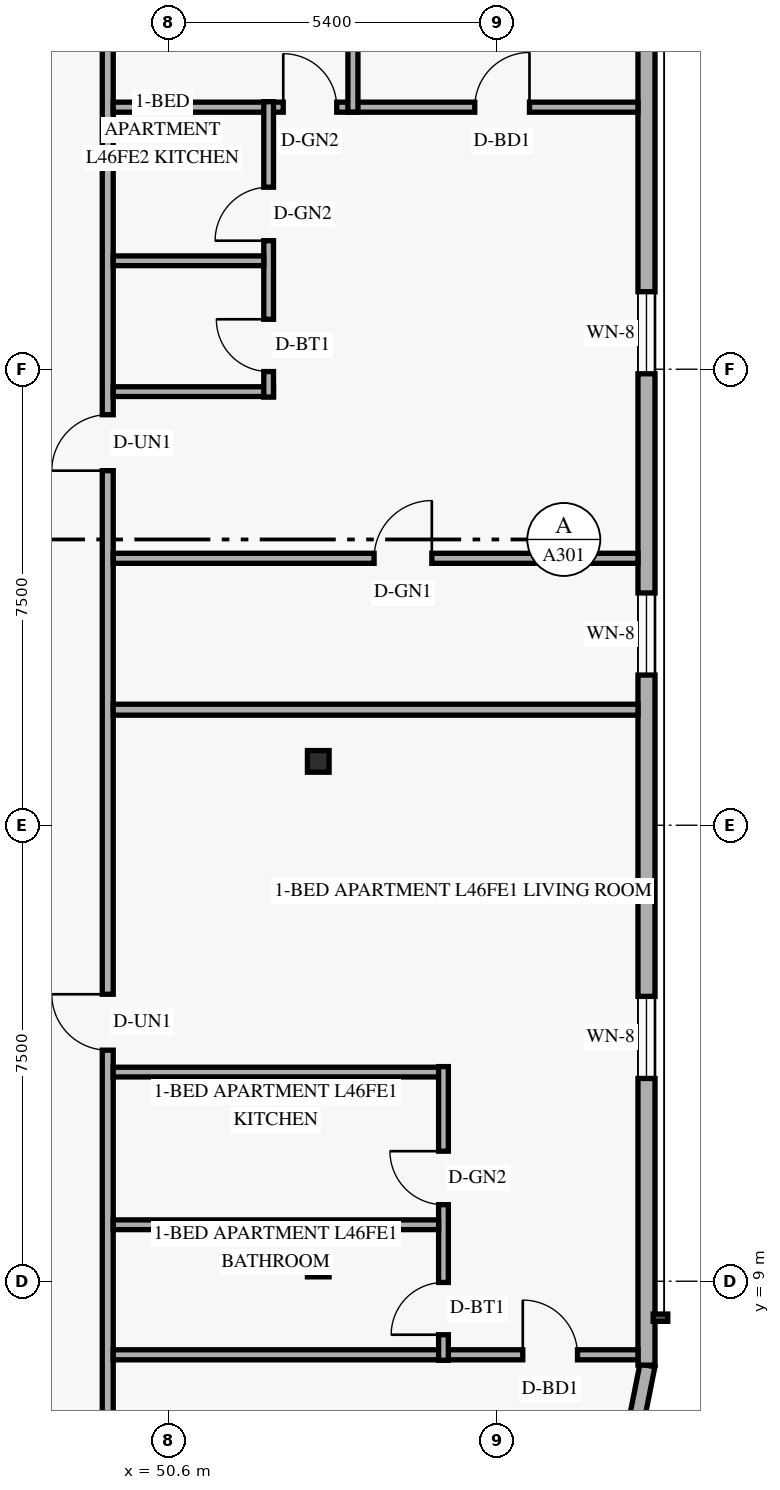
"""IFC4 building model, lengths in metres.
Left out: names, types, materials, properties, quantities, classifications, styles, units other than length and angle.
Written with IfcOpenShell. Run it as: python <this file> out.ifc"""

import sys

from ifc_helpers import new_model, si_unit, direction, frame, frame_2d, origin, origin_2d, place, context, subcontext, project, spatial, rectangle, hollow_rectangle, extrude, element, fill, save


model = new_model("IFC4")
c1 = context("Model", 3, precision=1e-05, world=origin(), true_north=direction((0.0, 1.0)))
c2 = subcontext(c1, "Body", "Model", "MODEL_VIEW")
j1 = project(units=[si_unit("LENGTHUNIT", "METRE"), si_unit("PLANEANGLEUNIT", "RADIAN")], contexts=[c1])
p1 = place(None, origin())
s1 = spatial("IfcSite", under=j1, at=p1, CompositionType="ELEMENT")
p2 = place(p1, origin())
s2 = spatial("IfcBuilding", under=s1, at=p2, CompositionType="ELEMENT")
p3 = place(p2, frame((0.0, 0.0, 177.6)))
s3 = spatial("IfcBuildingStorey", under=s2, at=p3, CompositionType="ELEMENT", Elevation=177.6)
for number, where, z_axis, x_axis in (
    (1, (52.958, 9.25, 0.0), (0.058, 0.0, 0.998), (0.0, 1.0, 0.0)),
    (2, (52.958, 17.55, 0.0), (0.058, 0.0, 0.998), (0.0, 1.0, 0.0)),
):
    element("IfcColumn", number, at=place(p3, frame(where, z_axis=z_axis, x_axis=x_axis)), inside=s3, PredefinedType="COLUMN", context=c2, shape_type="SweptSolid", body=[
        extrude(hollow_rectangle(XDim=0.356, YDim=0.356, WallThickness=0.016, at=origin_2d()), origin(), (0.0, 0.0, 1.0), 3.606),
    ])
p4 = place(p3, frame((58.205, 6.254, 0.0), z_axis=(0.0, 0.0, 1.0), x_axis=(0.19496651342, 0.980809899341, 0.0)))
e3 = element("IfcWall", 3, at=p4, inside=s3, PredefinedType="SOLIDWALL", context=c2, shape_type="SweptSolid", body=[
    extrude(rectangle(XDim=1.389, YDim=0.25, at=frame_2d((0.694, 0.0))), origin(), (0.0, 0.0, 1.0), 3.36),
])
p5 = place(p3, frame((58.46, 7.62, 0.0), z_axis=(0.0, 0.0, 1.0), x_axis=(0.0, 1.0, 0.0)))
e4 = element("IfcWall", 4, at=p5, inside=s3, PredefinedType="SOLIDWALL", context=c2, shape_type="SweptSolid", body=[
    extrude(rectangle(XDim=32.76, YDim=0.28, at=frame_2d((16.38, 0.0))), origin(), (0.0, 0.0, 1.0), 3.36),
])
p6 = place(p5, frame((4.715, 0.0, 0.85)))
e5 = element("IfcOpeningElement", 5, at=p6, cuts=e4, PredefinedType="OPENING", context=c2, shape_type="SweptSolid", body=[
    extrude(rectangle(XDim=1.35, YDim=1.55, at=frame_2d((0.675, 0.775))), frame((0.0, 0.15, 0.0), z_axis=(0.0, -1.0, 0.0), x_axis=(1.0, 0.0, 0.0)), (0.0, 0.0, 1.0), 0.3),
])
p7 = place(p5, frame((11.35, 0.0, 0.85)))
e6 = element("IfcOpeningElement", 6, at=p7, cuts=e4, PredefinedType="OPENING", context=c2, shape_type="SweptSolid", body=[
    extrude(rectangle(XDim=1.35, YDim=1.55, at=frame_2d((0.675, 0.775))), frame((0.0, 0.15, 0.0), z_axis=(0.0, -1.0, 0.0), x_axis=(1.0, 0.0, 0.0)), (0.0, 0.0, 1.0), 0.3),
])
p8 = place(p5, frame((16.305, 0.0, 0.85)))
e7 = element("IfcOpeningElement", 7, at=p8, cuts=e4, PredefinedType="OPENING", context=c2, shape_type="SweptSolid", body=[
    extrude(rectangle(XDim=1.35, YDim=1.55, at=frame_2d((0.675, 0.775))), frame((0.0, 0.15, 0.0), z_axis=(0.0, -1.0, 0.0), x_axis=(1.0, 0.0, 0.0)), (0.0, 0.0, 1.0), 0.3),
])
p9 = place(p5, frame((22.06, 0.0, 0.85)))
e8 = element("IfcOpeningElement", 8, at=p9, cuts=e4, PredefinedType="OPENING", context=c2, shape_type="SweptSolid", body=[
    extrude(rectangle(XDim=1.35, YDim=1.55, at=frame_2d((0.675, 0.775))), frame((0.0, 0.15, 0.0), z_axis=(0.0, -1.0, 0.0), x_axis=(1.0, 0.0, 0.0)), (0.0, 0.0, 1.0), 0.3),
])
p10 = place(p5, frame((27.05, 0.0, 0.85)))
e9 = element("IfcOpeningElement", 9, at=p10, cuts=e4, PredefinedType="OPENING", context=c2, shape_type="SweptSolid", body=[
    extrude(rectangle(XDim=1.35, YDim=1.55, at=frame_2d((0.675, 0.775))), frame((0.0, 0.15, 0.0), z_axis=(0.0, -1.0, 0.0), x_axis=(1.0, 0.0, 0.0)), (0.0, 0.0, 1.0), 0.3),
])
p11 = place(p5, frame((31.04, 0.0, 0.85)))
e10 = element("IfcOpeningElement", 10, at=p11, cuts=e4, PredefinedType="OPENING", context=c2, shape_type="SweptSolid", body=[
    extrude(rectangle(XDim=1.35, YDim=1.55, at=frame_2d((0.675, 0.775))), frame((0.0, 0.15, 0.0), z_axis=(0.0, -1.0, 0.0), x_axis=(1.0, 0.0, 0.0)), (0.0, 0.0, 1.0), 0.3),
])
p12 = place(p3, frame((49.6, 4.28, 0.0), z_axis=(0.0, 0.0, 1.0), x_axis=(0.0, 1.0, 0.0)))
e11 = element("IfcWall", 11, at=p12, inside=s3, PredefinedType="STANDARD", context=c2, shape_type="SweptSolid", body=[
    extrude(rectangle(XDim=39.44, YDim=0.18, at=frame_2d((19.72, 0.0))), origin(), (0.0, 0.0, 1.0), 2.73),
])
p13 = place(p12, frame((8.52, 0.0, 0.0)))
e12 = element("IfcOpeningElement", 12, at=p13, cuts=e11, PredefinedType="OPENING", context=c2, shape_type="SweptSolid", body=[
    extrude(rectangle(XDim=0.92, YDim=2.15, at=frame_2d((0.46, 1.075))), frame((0.0, 0.1, 0.0), z_axis=(0.0, -1.0, 0.0), x_axis=(1.0, 0.0, 0.0)), (0.0, 0.0, 1.0), 0.2),
])
p14 = place(p12, frame((18.052, 0.0, 0.0)))
e13 = element("IfcOpeningElement", 13, at=p14, cuts=e11, PredefinedType="OPENING", context=c2, shape_type="SweptSolid", body=[
    extrude(rectangle(XDim=0.92, YDim=2.15, at=frame_2d((0.46, 1.075))), frame((0.0, 0.1, 0.0), z_axis=(0.0, -1.0, 0.0), x_axis=(1.0, 0.0, 0.0)), (0.0, 0.0, 1.0), 0.2),
])
p15 = place(p12, frame((33.12, 0.0, 0.0)))
e14 = element("IfcOpeningElement", 14, at=p15, cuts=e11, PredefinedType="OPENING", context=c2, shape_type="SweptSolid", body=[
    extrude(rectangle(XDim=0.92, YDim=2.15, at=frame_2d((0.46, 1.075))), frame((0.0, 0.1, 0.0), z_axis=(0.0, -1.0, 0.0), x_axis=(1.0, 0.0, 0.0)), (0.0, 0.0, 1.0), 0.2),
])
p16 = place(p3, frame((49.69, 7.79, 0.0), z_axis=(0.0, 0.0, 1.0), x_axis=(1.0, 0.0, 0.0)))
e15 = element("IfcWall", 15, at=p16, inside=s3, PredefinedType="PARTITIONING", context=c2, shape_type="SweptSolid", body=[
    extrude(rectangle(XDim=8.63, YDim=0.165, at=frame_2d((4.315, 0.0))), origin(), (0.0, 0.0, 1.0), 2.879),
])
p17 = place(p16, frame((6.736, 0.0, 0.0)))
e16 = element("IfcOpeningElement", 16, at=p17, cuts=e15, PredefinedType="OPENING", context=c2, shape_type="SweptSolid", body=[
    extrude(rectangle(XDim=0.9, YDim=2.14, at=frame_2d((0.45, 1.07))), frame((0.0, 0.093, 0.0), z_axis=(0.0, -1.0, 0.0), x_axis=(1.0, 0.0, 0.0)), (0.0, 0.0, 1.0), 0.185),
])
p18 = place(p3, frame((49.69, 12.44, 0.0), z_axis=(0.0, 0.0, 1.0), x_axis=(1.0, 0.0, 0.0)))
e17 = element("IfcWall", 17, at=p18, inside=s3, PredefinedType="PLUMBINGWALL", context=c2, shape_type="SweptSolid", body=[
    extrude(rectangle(XDim=5.511, YDim=0.16, at=frame_2d((2.756, 0.0))), origin(), (0.0, 0.0, 1.0), 2.879),
])
p19 = place(p3, frame((55.121, 7.7, 0.0), z_axis=(0.0, 0.0, 1.0), x_axis=(0.0, 1.0, 0.0)))
e18 = element("IfcWall", 18, at=p19, inside=s3, PredefinedType="PLUMBINGWALL", context=c2, shape_type="SweptSolid", body=[
    extrude(rectangle(XDim=4.83, YDim=0.16, at=frame_2d((2.415, 0.0))), origin(), (0.0, 0.0, 1.0), 3.36),
])
p20 = place(p19, frame((0.42, 0.0, 0.0)))
e19 = element("IfcOpeningElement", 19, at=p20, cuts=e18, PredefinedType="OPENING", context=c2, shape_type="SweptSolid", body=[
    extrude(rectangle(XDim=0.86, YDim=2.12, at=frame_2d((0.43, 1.06))), frame((0.0, 0.09, 0.0), z_axis=(0.0, -1.0, 0.0), x_axis=(1.0, 0.0, 0.0)), (0.0, 0.0, 1.0), 0.18),
])
p21 = place(p19, frame((2.559, 0.0, 0.0)))
e20 = element("IfcOpeningElement", 20, at=p21, cuts=e18, PredefinedType="OPENING", context=c2, shape_type="SweptSolid", body=[
    extrude(rectangle(XDim=0.88, YDim=2.12, at=frame_2d((0.44, 1.06))), frame((0.0, 0.09, 0.0), z_axis=(0.0, -1.0, 0.0), x_axis=(1.0, 0.0, 0.0)), (0.0, 0.0, 1.0), 0.18),
])
p22 = place(p3, frame((49.69, 9.929, 0.0), z_axis=(0.0, 0.0, 1.0), x_axis=(1.0, 0.0, 0.0)))
e21 = element("IfcWall", 21, at=p22, inside=s3, PredefinedType="PLUMBINGWALL", context=c2, shape_type="SweptSolid", body=[
    extrude(rectangle(XDim=5.351, YDim=0.16, at=frame_2d((2.676, 0.0))), origin(), (0.0, 0.0, 1.0), 2.879),
])
p23 = place(p3, frame((49.69, 18.4, 0.0), z_axis=(0.0, 0.0, 1.0), x_axis=(1.0, 0.0, 0.0)))
e22 = element("IfcWall", 22, at=p23, inside=s3, PredefinedType="PARTITIONING", context=c2, shape_type="SweptSolid", body=[
    extrude(rectangle(XDim=8.63, YDim=0.18, at=frame_2d((4.315, 0.0))), origin(), (0.0, 0.0, 1.0), 2.879),
])
p24 = place(p3, frame((49.69, 28.31, 0.0), z_axis=(0.0, 0.0, 1.0), x_axis=(1.0, 0.0, 0.0)))
e23 = element("IfcWall", 23, at=p24, inside=s3, PredefinedType="PARTITIONING", context=c2, shape_type="SweptSolid", body=[
    extrude(rectangle(XDim=8.63, YDim=0.165, at=frame_2d((4.315, 0.0))), origin(), (0.0, 0.0, 1.0), 2.879),
])
p25 = place(p24, frame((2.796, 0.0, 0.0)))
e24 = element("IfcOpeningElement", 24, at=p25, cuts=e23, PredefinedType="OPENING", context=c2, shape_type="SweptSolid", body=[
    extrude(rectangle(XDim=0.88, YDim=2.12, at=frame_2d((0.44, 1.06))), frame((0.0, 0.093, 0.0), z_axis=(0.0, -1.0, 0.0), x_axis=(1.0, 0.0, 0.0)), (0.0, 0.0, 1.0), 0.185),
])
p26 = place(p24, frame((5.946, 0.0, 0.0)))
e25 = element("IfcOpeningElement", 25, at=p26, cuts=e23, PredefinedType="OPENING", context=c2, shape_type="SweptSolid", body=[
    extrude(rectangle(XDim=0.9, YDim=2.14, at=frame_2d((0.45, 1.07))), frame((0.0, 0.093, 0.0), z_axis=(0.0, -1.0, 0.0), x_axis=(1.0, 0.0, 0.0)), (0.0, 0.0, 1.0), 0.185),
])
p27 = place(p3, frame((49.69, 23.632, 0.0), z_axis=(0.0, 0.0, 1.0), x_axis=(1.0, 0.0, 0.0)))
e26 = element("IfcWall", 26, at=p27, inside=s3, PredefinedType="PLUMBINGWALL", context=c2, shape_type="SweptSolid", body=[
    extrude(rectangle(XDim=2.636, YDim=0.16, at=frame_2d((1.318, 0.0))), origin(), (0.0, 0.0, 1.0), 3.36),
])
p28 = place(p3, frame((52.246, 23.542, 0.0), z_axis=(0.0, 0.0, 1.0), x_axis=(0.0, 1.0, 0.0)))
e27 = element("IfcWall", 27, at=p28, inside=s3, PredefinedType="PLUMBINGWALL", context=c2, shape_type="SweptSolid", body=[
    extrude(rectangle(XDim=4.858, YDim=0.16, at=frame_2d((2.429, 0.0))), origin(), (0.0, 0.0, 1.0), 3.36),
])
p29 = place(p28, frame((0.42, 0.0, 0.0)))
e28 = element("IfcOpeningElement", 28, at=p29, cuts=e27, PredefinedType="OPENING", context=c2, shape_type="SweptSolid", body=[
    extrude(rectangle(XDim=0.86, YDim=2.12, at=frame_2d((0.43, 1.06))), frame((0.0, 0.09, 0.0), z_axis=(0.0, -1.0, 0.0), x_axis=(1.0, 0.0, 0.0)), (0.0, 0.0, 1.0), 0.18),
])
p30 = place(p28, frame((2.572, 0.0, 0.0)))
e29 = element("IfcOpeningElement", 29, at=p30, cuts=e27, PredefinedType="OPENING", context=c2, shape_type="SweptSolid", body=[
    extrude(rectangle(XDim=0.88, YDim=2.12, at=frame_2d((0.44, 1.06))), frame((0.0, 0.09, 0.0), z_axis=(0.0, -1.0, 0.0), x_axis=(1.0, 0.0, 0.0)), (0.0, 0.0, 1.0), 0.18),
])
p31 = place(p3, frame((49.69, 25.784, 0.0), z_axis=(0.0, 0.0, 1.0), x_axis=(1.0, 0.0, 0.0)))
e30 = element("IfcWall", 30, at=p31, inside=s3, PredefinedType="PLUMBINGWALL", context=c2, shape_type="SweptSolid", body=[
    extrude(rectangle(XDim=2.476, YDim=0.16, at=frame_2d((1.238, 0.0))), origin(), (0.0, 0.0, 1.0), 3.36),
])
p32 = place(p3, frame((49.69, 20.89, 0.0), z_axis=(0.0, 0.0, 1.0), x_axis=(1.0, 0.0, 0.0)))
e31 = element("IfcWall", 31, at=p32, inside=s3, PredefinedType="PARTITIONING", context=c2, shape_type="SweptSolid", body=[
    extrude(rectangle(XDim=8.63, YDim=0.165, at=frame_2d((4.315, 0.0))), origin(), (0.0, 0.0, 1.0), 2.879),
])
p33 = place(p32, frame((4.29, 0.0, 0.0)))
e32 = element("IfcOpeningElement", 32, at=p33, cuts=e31, PredefinedType="OPENING", context=c2, shape_type="SweptSolid", body=[
    extrude(rectangle(XDim=0.95, YDim=2.15, at=frame_2d((0.475, 1.075))), frame((0.0, 0.093, 0.0), z_axis=(0.0, -1.0, 0.0), x_axis=(1.0, 0.0, 0.0)), (0.0, 0.0, 1.0), 0.185),
])
p34 = place(p3, frame((53.632, 28.23, 0.0), z_axis=(0.0, 0.0, 1.0), x_axis=(0.0, 1.0, 0.0)))
e33 = element("IfcWall", 33, at=p34, inside=s3, PredefinedType="PARTITIONING", context=c2, shape_type="SweptSolid", body=[
    extrude(rectangle(XDim=4.56, YDim=0.165, at=frame_2d((2.28, 0.0))), origin(), (0.0, 0.0, 1.0), 3.36),
])
p35 = place(p6, origin())
e34 = element("IfcWindow", 34, at=p35, inside=s3, PartitioningType="SINGLE_PANEL", PredefinedType="WINDOW", context=c2, shape_type="SweptSolid", body=[
    extrude(rectangle(XDim=1.35, YDim=1.55, at=frame_2d((0.675, 0.775))), frame((0.0, 0.03, 0.0), z_axis=(0.0, -1.0, 0.0), x_axis=(1.0, 0.0, 0.0)), (0.0, 0.0, 1.0), 0.06),
])
fill(e5, e34)
p36 = place(p7, origin())
e35 = element("IfcWindow", 35, at=p36, inside=s3, PartitioningType="SINGLE_PANEL", PredefinedType="WINDOW", context=c2, shape_type="SweptSolid", body=[
    extrude(rectangle(XDim=1.35, YDim=1.55, at=frame_2d((0.675, 0.775))), frame((0.0, 0.03, 0.0), z_axis=(0.0, -1.0, 0.0), x_axis=(1.0, 0.0, 0.0)), (0.0, 0.0, 1.0), 0.06),
])
fill(e6, e35)
p37 = place(p8, origin())
e36 = element("IfcWindow", 36, at=p37, inside=s3, PartitioningType="SINGLE_PANEL", PredefinedType="WINDOW", context=c2, shape_type="SweptSolid", body=[
    extrude(rectangle(XDim=1.35, YDim=1.55, at=frame_2d((0.675, 0.775))), frame((0.0, 0.03, 0.0), z_axis=(0.0, -1.0, 0.0), x_axis=(1.0, 0.0, 0.0)), (0.0, 0.0, 1.0), 0.06),
])
fill(e7, e36)
p38 = place(p13, origin())
e37 = element("IfcDoor", 37, at=p38, inside=s3, OperationType="SINGLE_SWING_RIGHT", PredefinedType="DOOR", context=c2, shape_type="SweptSolid", body=[
    extrude(rectangle(XDim=0.92, YDim=2.15, at=frame_2d((0.46, 1.075))), frame((0.0, 0.025, 0.0), z_axis=(0.0, -1.0, 0.0), x_axis=(1.0, 0.0, 0.0)), (0.0, 0.0, 1.0), 0.05),
])
fill(e12, e37)
p39 = place(p20, origin())
e38 = element("IfcDoor", 38, at=p39, inside=s3, OperationType="SINGLE_SWING_LEFT", PredefinedType="DOOR", context=c2, shape_type="SweptSolid", body=[
    extrude(rectangle(XDim=0.86, YDim=2.12, at=frame_2d((0.43, 1.06))), frame((0.0, 0.025, 0.0), z_axis=(0.0, -1.0, 0.0), x_axis=(1.0, 0.0, 0.0)), (0.0, 0.0, 1.0), 0.05),
])
fill(e19, e38)
p40 = place(p21, origin())
e39 = element("IfcDoor", 39, at=p40, inside=s3, OperationType="SINGLE_SWING_RIGHT", PredefinedType="DOOR", context=c2, shape_type="SweptSolid", body=[
    extrude(rectangle(XDim=0.88, YDim=2.12, at=frame_2d((0.44, 1.06))), frame((0.0, 0.025, 0.0), z_axis=(0.0, -1.0, 0.0), x_axis=(1.0, 0.0, 0.0)), (0.0, 0.0, 1.0), 0.05),
])
fill(e20, e39)
p41 = place(p17, origin())
e40 = element("IfcDoor", 40, at=p41, inside=s3, OperationType="SINGLE_SWING_LEFT", PredefinedType="DOOR", context=c2, shape_type="SweptSolid", body=[
    extrude(rectangle(XDim=0.9, YDim=2.14, at=frame_2d((0.45, 1.07))), frame((0.0, 0.025, 0.0), z_axis=(0.0, -1.0, 0.0), x_axis=(1.0, 0.0, 0.0)), (0.0, 0.0, 1.0), 0.05),
])
fill(e16, e40)
p42 = place(p33, origin())
e41 = element("IfcDoor", 41, at=p42, inside=s3, OperationType="SINGLE_SWING_RIGHT", PredefinedType="DOOR", context=c2, shape_type="SweptSolid", body=[
    extrude(rectangle(XDim=0.95, YDim=2.15, at=frame_2d((0.475, 1.075))), frame((0.0, 0.025, 0.0), z_axis=(0.0, -1.0, 0.0), x_axis=(1.0, 0.0, 0.0)), (0.0, 0.0, 1.0), 0.05),
])
fill(e32, e41)
p43 = place(p14, origin())
e42 = element("IfcDoor", 42, at=p43, inside=s3, OperationType="SINGLE_SWING_LEFT", PredefinedType="DOOR", context=c2, shape_type="SweptSolid", body=[
    extrude(rectangle(XDim=0.92, YDim=2.15, at=frame_2d((0.46, 1.075))), frame((0.0, 0.025, 0.0), z_axis=(0.0, -1.0, 0.0), x_axis=(1.0, 0.0, 0.0)), (0.0, 0.0, 1.0), 0.05),
])
fill(e13, e42)
p44 = place(p29, origin())
e43 = element("IfcDoor", 43, at=p44, inside=s3, OperationType="SINGLE_SWING_RIGHT", PredefinedType="DOOR", context=c2, shape_type="SweptSolid", body=[
    extrude(rectangle(XDim=0.86, YDim=2.12, at=frame_2d((0.43, 1.06))), frame((0.0, 0.025, 0.0), z_axis=(0.0, -1.0, 0.0), x_axis=(1.0, 0.0, 0.0)), (0.0, 0.0, 1.0), 0.05),
])
fill(e28, e43)
p45 = place(p30, origin())
e44 = element("IfcDoor", 44, at=p45, inside=s3, OperationType="SINGLE_SWING_LEFT", PredefinedType="DOOR", context=c2, shape_type="SweptSolid", body=[
    extrude(rectangle(XDim=0.88, YDim=2.12, at=frame_2d((0.44, 1.06))), frame((0.0, 0.025, 0.0), z_axis=(0.0, -1.0, 0.0), x_axis=(1.0, 0.0, 0.0)), (0.0, 0.0, 1.0), 0.05),
])
fill(e29, e44)
p46 = place(p25, origin())
e45 = element("IfcDoor", 45, at=p46, inside=s3, OperationType="SINGLE_SWING_LEFT", PredefinedType="DOOR", context=c2, shape_type="SweptSolid", body=[
    extrude(rectangle(XDim=0.88, YDim=2.12, at=frame_2d((0.44, 1.06))), frame((0.0, 0.025, 0.0), z_axis=(0.0, -1.0, 0.0), x_axis=(1.0, 0.0, 0.0)), (0.0, 0.0, 1.0), 0.05),
])
fill(e24, e45)
p47 = place(p26, origin())
e46 = element("IfcDoor", 46, at=p47, inside=s3, OperationType="SINGLE_SWING_RIGHT", PredefinedType="DOOR", context=c2, shape_type="SweptSolid", body=[
    extrude(rectangle(XDim=0.9, YDim=2.14, at=frame_2d((0.45, 1.07))), frame((0.0, 0.025, 0.0), z_axis=(0.0, -1.0, 0.0), x_axis=(1.0, 0.0, 0.0)), (0.0, 0.0, 1.0), 0.05),
])
fill(e25, e46)
save(model, sys.argv[1])
